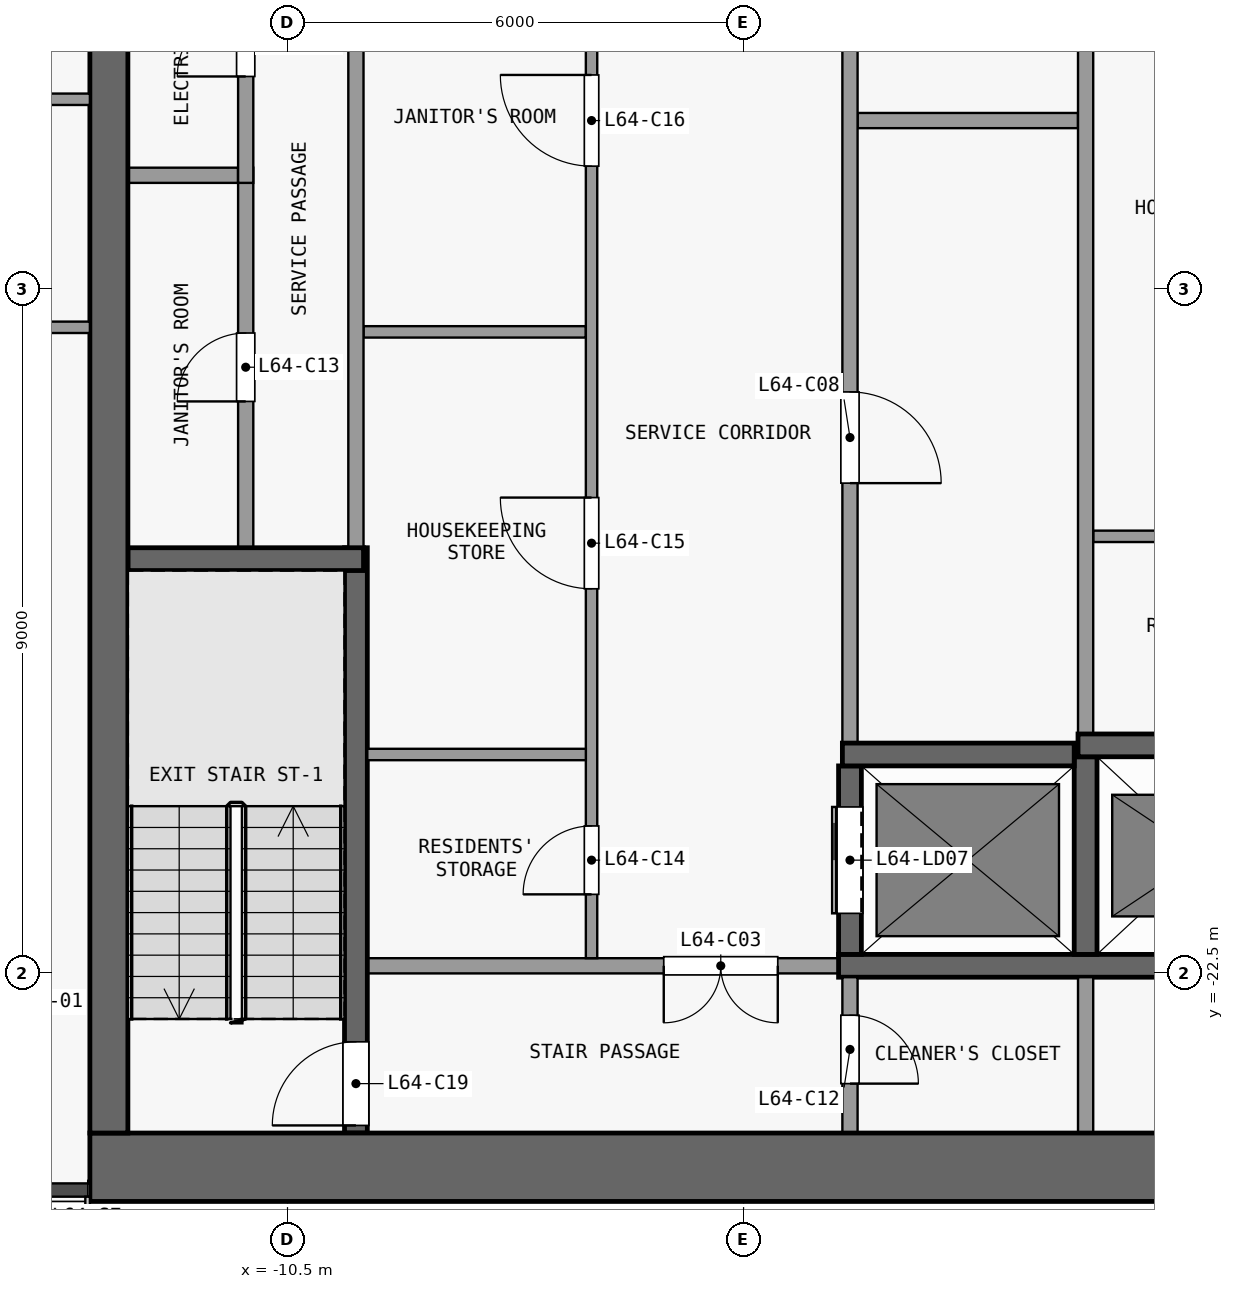
"""IFC4 building model, lengths in metres.
Left out: names, types, materials, properties, quantities, classifications, styles, units other than length and angle.
Written with IfcOpenShell. Run it as: python <this file> out.ifc"""

import sys

from ifc_helpers import new_model, si_unit, direction, frame, frame_2d, origin, place, context, subcontext, project, spatial, rectangle, extrude, element, fill, save


model = new_model("IFC4")
c1 = context("Model", 3, precision=1e-05, world=origin(), true_north=direction((0.0, 1.0)))
c2 = subcontext(c1, "Body", "Model", "MODEL_VIEW")
j1 = project(units=[si_unit("LENGTHUNIT", "METRE"), si_unit("PLANEANGLEUNIT", "RADIAN")], contexts=[c1])
p1 = place(None, origin())
s1 = spatial("IfcSite", under=j1, at=p1, CompositionType="ELEMENT")
p2 = place(p1, origin())
s2 = spatial("IfcBuilding", under=s1, at=p2, CompositionType="ELEMENT")
p3 = place(p2, frame((0.0, 0.0, 255.5)))
s3 = spatial("IfcBuildingStorey", under=s2, at=p3, CompositionType="ELEMENT", Elevation=255.5)
p4 = place(p3, frame((-13.1, -25.05, 0.0), z_axis=(0.0, 0.0, 1.0), x_axis=(1.0, 0.0, 0.0)))
e1 = element("IfcWall", 1, at=p4, inside=s3, PredefinedType="SHEAR", context=c2, shape_type="SweptSolid", body=[
    extrude(rectangle(XDim=26.2, YDim=0.9, at=frame_2d((13.1, 0.0))), origin(), (0.0, 0.0, 1.0), 3.3),
])
p5 = place(p3, frame((-12.85, -24.6, 0.0), z_axis=(0.0, 0.0, 1.0), x_axis=(0.0, 1.0, 0.0)))
e2 = element("IfcWall", 2, at=p5, inside=s3, PredefinedType="SHEAR", context=c2, shape_type="SweptSolid", body=[
    extrude(rectangle(XDim=16.1, YDim=0.5, at=frame_2d((8.05, 0.0))), origin(), (0.0, 0.0, 1.0), 3.3),
])
p6 = place(p3, frame((-3.25, -22.4, 0.0), z_axis=(0.0, 0.0, 1.0), x_axis=(-1.0, 0.0, 0.0)))
e3 = element("IfcWall", 3, at=p6, inside=s3, PredefinedType="PARTITIONING", context=c2, shape_type="SweptSolid", body=[
    extrude(rectangle(XDim=6.2, YDim=0.2, at=frame_2d((3.1, 0.0))), origin(), (0.0, 0.0, 1.0), 3.3),
])
p7 = place(p6, frame((0.8, 0.0, 0.0)))
e4 = element("IfcOpeningElement", 4, at=p7, cuts=e3, PredefinedType="OPENING", context=c2, shape_type="SweptSolid", body=[
    extrude(rectangle(XDim=1.5, YDim=2.1, at=frame_2d((0.75, 1.05))), frame((0.0, 0.11, 0.0), z_axis=(0.0, -1.0, 0.0), x_axis=(1.0, 0.0, 0.0)), (0.0, 0.0, 1.0), 0.22),
])
p8 = place(p3, frame((-3.25, -22.4, 0.0), z_axis=(0.0, 0.0, 1.0), x_axis=(1.0, 0.0, 0.0)))
e5 = element("IfcWall", 5, at=p8, inside=s3, PredefinedType="SHEAR", context=c2, shape_type="SweptSolid", body=[
    extrude(rectangle(XDim=6.5, YDim=0.3, at=frame_2d((3.25, 0.0))), origin(), (0.0, 0.0, 1.0), 3.3),
])
p9 = place(p3, frame((-9.45, -19.62, 0.0), z_axis=(0.0, 0.0, 1.0), x_axis=(1.0, 0.0, 0.0)))
e6 = element("IfcWall", 6, at=p9, inside=s3, PredefinedType="PARTITIONING", context=c2, shape_type="SweptSolid", body=[
    extrude(rectangle(XDim=2.875, YDim=0.15, at=frame_2d((1.438, 0.0))), origin(), (0.0, 0.0, 1.0), 3.3),
])
p10 = place(p3, frame((-3.2, -19.62, 0.0), z_axis=(0.0, 0.0, 1.0), x_axis=(1.0, 0.0, 0.0)))
e7 = element("IfcWall", 7, at=p10, inside=s3, PredefinedType="SHEAR", context=c2, shape_type="SweptSolid", body=[
    extrude(rectangle(XDim=3.05, YDim=0.3, at=frame_2d((1.525, 0.0))), origin(), (0.0, 0.0, 1.0), 3.3),
])
p11 = place(p3, frame((-0.1, -19.5, 0.0), z_axis=(0.0, 0.0, 1.0), x_axis=(1.0, 0.0, 0.0)))
e8 = element("IfcWall", 8, at=p11, inside=s3, PredefinedType="SHEAR", context=c2, shape_type="SweptSolid", body=[
    extrude(rectangle(XDim=3.275, YDim=0.3, at=frame_2d((1.638, 0.0))), origin(), (0.0, 0.0, 1.0), 3.3),
])
p12 = place(p3, frame((-12.6, -17.05, 0.0), z_axis=(0.0, 0.0, 1.0), x_axis=(1.0, 0.0, 0.0)))
e9 = element("IfcWall", 9, at=p12, inside=s3, PredefinedType="SHEAR", context=c2, shape_type="SweptSolid", body=[
    extrude(rectangle(XDim=3.1, YDim=0.3, at=frame_2d((1.55, 0.0))), origin(), (0.0, 0.0, 1.0), 3.3),
])
p13 = place(p3, frame((0.1, -16.75, 0.0), z_axis=(0.0, 0.0, 1.0), x_axis=(1.0, 0.0, 0.0)))
e10 = element("IfcWall", 10, at=p13, inside=s3, PredefinedType="PARTITIONING", context=c2, shape_type="SweptSolid", body=[
    extrude(rectangle(XDim=2.925, YDim=0.15, at=frame_2d((1.462, 0.0))), origin(), (0.0, 0.0, 1.0), 3.3),
])
p14 = place(p3, frame((-9.5, -14.06, 0.0), z_axis=(0.0, 0.0, 1.0), x_axis=(1.0, 0.0, 0.0)))
e11 = element("IfcWall", 11, at=p14, inside=s3, PredefinedType="PARTITIONING", context=c2, shape_type="SweptSolid", body=[
    extrude(rectangle(XDim=2.925, YDim=0.15, at=frame_2d((1.462, 0.0))), origin(), (0.0, 0.0, 1.0), 3.3),
])
p15 = place(p3, frame((-12.6, -12.0, 0.0), z_axis=(0.0, 0.0, 1.0), x_axis=(1.0, 0.0, 0.0)))
e12 = element("IfcWall", 12, at=p15, inside=s3, PredefinedType="PARTITIONING", context=c2, shape_type="SweptSolid", body=[
    extrude(rectangle(XDim=1.45, YDim=0.2, at=frame_2d((0.725, 0.0))), origin(), (0.0, 0.0, 1.0), 3.3),
])
p16 = place(p3, frame((-3.0, -11.28, 0.0), z_axis=(0.0, 0.0, 1.0), x_axis=(1.0, 0.0, 0.0)))
e13 = element("IfcWall", 13, at=p16, inside=s3, PredefinedType="PARTITIONING", context=c2, shape_type="SweptSolid", body=[
    extrude(rectangle(XDim=2.9, YDim=0.2, at=frame_2d((1.45, 0.0))), origin(), (0.0, 0.0, 1.0), 3.3),
])
p17 = place(p3, frame((-11.05, -16.9, 0.0), z_axis=(0.0, 0.0, 1.0), x_axis=(0.0, 1.0, 0.0)))
e14 = element("IfcWall", 14, at=p17, inside=s3, PredefinedType="PARTITIONING", context=c2, shape_type="SweptSolid", body=[
    extrude(rectangle(XDim=5.0, YDim=0.2, at=frame_2d((2.5, 0.0))), origin(), (0.0, 0.0, 1.0), 3.3),
])
p18 = place(p17, frame((1.925, 0.0, 0.0)))
e15 = element("IfcOpeningElement", 15, at=p18, cuts=e14, PredefinedType="OPENING", context=c2, shape_type="SweptSolid", body=[
    extrude(rectangle(XDim=0.9, YDim=2.1, at=frame_2d((0.45, 1.05))), frame((0.0, 0.11, 0.0), z_axis=(0.0, -1.0, 0.0), x_axis=(1.0, 0.0, 0.0)), (0.0, 0.0, 1.0), 0.22),
])
p19 = place(p3, frame((-11.05, -12.1, 0.0), z_axis=(0.0, 0.0, 1.0), x_axis=(0.0, 1.0, 0.0)))
e16 = element("IfcWall", 16, at=p19, inside=s3, PredefinedType="PARTITIONING", context=c2, shape_type="SweptSolid", body=[
    extrude(rectangle(XDim=3.6, YDim=0.2, at=frame_2d((1.8, 0.0))), origin(), (0.0, 0.0, 1.0), 3.3),
])
p20 = place(p19, frame((1.4, 0.0, 0.0)))
e17 = element("IfcOpeningElement", 17, at=p20, cuts=e16, PredefinedType="OPENING", context=c2, shape_type="SweptSolid", body=[
    extrude(rectangle(XDim=0.9, YDim=2.1, at=frame_2d((0.45, 1.05))), frame((0.0, 0.11, 0.0), z_axis=(0.0, -1.0, 0.0), x_axis=(1.0, 0.0, 0.0)), (0.0, 0.0, 1.0), 0.22),
])
p21 = place(p3, frame((-9.6, -24.6, 0.0), z_axis=(0.0, 0.0, 1.0), x_axis=(0.0, 1.0, 0.0)))
e18 = element("IfcWall", 18, at=p21, inside=s3, PredefinedType="SHEAR", context=c2, shape_type="SweptSolid", body=[
    extrude(rectangle(XDim=7.7, YDim=0.3, at=frame_2d((3.85, 0.0))), origin(), (0.0, 0.0, 1.0), 3.3),
])
p22 = place(p21, frame((0.1, 0.0, 0.0)))
e19 = element("IfcOpeningElement", 19, at=p22, cuts=e18, PredefinedType="OPENING", context=c2, shape_type="SweptSolid", body=[
    extrude(rectangle(XDim=1.1, YDim=2.1, at=frame_2d((0.55, 1.05))), frame((0.0, 0.16, 0.0), z_axis=(0.0, -1.0, 0.0), x_axis=(1.0, 0.0, 0.0)), (0.0, 0.0, 1.0), 0.32),
])
p23 = place(p3, frame((-9.6, -16.9, 0.0), z_axis=(0.0, 0.0, 1.0), x_axis=(0.0, 1.0, 0.0)))
e20 = element("IfcWall", 20, at=p23, inside=s3, PredefinedType="PARTITIONING", context=c2, shape_type="SweptSolid", body=[
    extrude(rectangle(XDim=8.4, YDim=0.2, at=frame_2d((4.2, 0.0))), origin(), (0.0, 0.0, 1.0), 3.3),
])
p24 = place(p3, frame((-6.5, -22.3, 0.0), z_axis=(0.0, 0.0, 1.0), x_axis=(0.0, 1.0, 0.0)))
e21 = element("IfcWall", 21, at=p24, inside=s3, PredefinedType="PARTITIONING", context=c2, shape_type="SweptSolid", body=[
    extrude(rectangle(XDim=13.8, YDim=0.15, at=frame_2d((6.9, 0.0))), origin(), (0.0, 0.0, 1.0), 3.3),
])
p25 = place(p24, frame((0.84, 0.0, 0.0)))
e22 = element("IfcOpeningElement", 22, at=p25, cuts=e21, PredefinedType="OPENING", context=c2, shape_type="SweptSolid", body=[
    extrude(rectangle(XDim=0.9, YDim=2.1, at=frame_2d((0.45, 1.05))), frame((0.0, 0.085, 0.0), z_axis=(0.0, -1.0, 0.0), x_axis=(1.0, 0.0, 0.0)), (0.0, 0.0, 1.0), 0.17),
])
p26 = place(p24, frame((4.86, 0.0, 0.0)))
e23 = element("IfcOpeningElement", 23, at=p26, cuts=e21, PredefinedType="OPENING", context=c2, shape_type="SweptSolid", body=[
    extrude(rectangle(XDim=1.2, YDim=2.1, at=frame_2d((0.6, 1.05))), frame((0.0, 0.085, 0.0), z_axis=(0.0, -1.0, 0.0), x_axis=(1.0, 0.0, 0.0)), (0.0, 0.0, 1.0), 0.17),
])
p27 = place(p24, frame((10.42, 0.0, 0.0)))
e24 = element("IfcOpeningElement", 24, at=p27, cuts=e21, PredefinedType="OPENING", context=c2, shape_type="SweptSolid", body=[
    extrude(rectangle(XDim=1.2, YDim=2.1, at=frame_2d((0.6, 1.05))), frame((0.0, 0.085, 0.0), z_axis=(0.0, -1.0, 0.0), x_axis=(1.0, 0.0, 0.0)), (0.0, 0.0, 1.0), 0.17),
])
p28 = place(p3, frame((-3.1, -22.55, 0.0), z_axis=(0.0, 0.0, 1.0), x_axis=(0.0, -1.0, 0.0)))
e25 = element("IfcWall", 25, at=p28, inside=s3, PredefinedType="PARTITIONING", context=c2, shape_type="SweptSolid", body=[
    extrude(rectangle(XDim=2.05, YDim=0.2, at=frame_2d((1.025, 0.0))), origin(), (0.0, 0.0, 1.0), 3.3),
])
p29 = place(p28, frame((0.5, 0.0, 0.0)))
e26 = element("IfcOpeningElement", 26, at=p29, cuts=e25, PredefinedType="OPENING", context=c2, shape_type="SweptSolid", body=[
    extrude(rectangle(XDim=0.9, YDim=2.1, at=frame_2d((0.45, 1.05))), frame((0.0, 0.11, 0.0), z_axis=(0.0, -1.0, 0.0), x_axis=(1.0, 0.0, 0.0)), (0.0, 0.0, 1.0), 0.22),
])
p30 = place(p3, frame((-3.1, -22.25, 0.0), z_axis=(0.0, 0.0, 1.0), x_axis=(0.0, 1.0, 0.0)))
e27 = element("IfcWall", 27, at=p30, inside=s3, PredefinedType="SHEAR", context=c2, shape_type="SweptSolid", body=[
    extrude(rectangle(XDim=2.48, YDim=0.3, at=frame_2d((1.24, 0.0))), origin(), (0.0, 0.0, 1.0), 3.3),
])
p31 = place(p30, frame((0.54, 0.0, 0.0)))
e28 = element("IfcOpeningElement", 28, at=p31, cuts=e27, PredefinedType="OPENING", context=c2, shape_type="SweptSolid", body=[
    extrude(rectangle(XDim=1.4, YDim=2.1, at=frame_2d((0.7, 1.05))), frame((0.0, 0.16, 0.0), z_axis=(0.0, -1.0, 0.0), x_axis=(1.0, 0.0, 0.0)), (0.0, 0.0, 1.0), 0.32),
])
p32 = place(p3, frame((-3.1, -8.5, 0.0), z_axis=(0.0, 0.0, 1.0), x_axis=(0.0, -1.0, 0.0)))
e29 = element("IfcWall", 29, at=p32, inside=s3, PredefinedType="PARTITIONING", context=c2, shape_type="SweptSolid", body=[
    extrude(rectangle(XDim=10.97, YDim=0.2, at=frame_2d((5.485, 0.0))), origin(), (0.0, 0.0, 1.0), 3.3),
])
p33 = place(p32, frame((6.35, 0.0, 0.0)))
e30 = element("IfcOpeningElement", 30, at=p33, cuts=e29, PredefinedType="OPENING", context=c2, shape_type="SweptSolid", body=[
    extrude(rectangle(XDim=1.2, YDim=2.1, at=frame_2d((0.6, 1.05))), frame((0.0, 0.11, 0.0), z_axis=(0.0, -1.0, 0.0), x_axis=(1.0, 0.0, 0.0)), (0.0, 0.0, 1.0), 0.22),
])
p34 = place(p32, frame((0.94, 0.0, 0.0)))
e31 = element("IfcOpeningElement", 31, at=p34, cuts=e29, PredefinedType="OPENING", context=c2, shape_type="SweptSolid", body=[
    extrude(rectangle(XDim=0.9, YDim=2.1, at=frame_2d((0.45, 1.05))), frame((0.0, 0.11, 0.0), z_axis=(0.0, -1.0, 0.0), x_axis=(1.0, 0.0, 0.0)), (0.0, 0.0, 1.0), 0.22),
])
p35 = place(p3, frame((0.0, -24.6, 0.0), z_axis=(0.0, 0.0, 1.0), x_axis=(0.0, 1.0, 0.0)))
e32 = element("IfcWall", 32, at=p35, inside=s3, PredefinedType="PARTITIONING", context=c2, shape_type="SweptSolid", body=[
    extrude(rectangle(XDim=2.05, YDim=0.2, at=frame_2d((1.025, 0.0))), origin(), (0.0, 0.0, 1.0), 3.3),
])
p36 = place(p3, frame((0.0, -22.25, 0.0), z_axis=(0.0, 0.0, 1.0), x_axis=(0.0, 1.0, 0.0)))
e33 = element("IfcWall", 33, at=p36, inside=s3, PredefinedType="SHEAR", context=c2, shape_type="SweptSolid", body=[
    extrude(rectangle(XDim=2.6, YDim=0.3, at=frame_2d((1.3, 0.0))), origin(), (0.0, 0.0, 1.0), 3.3),
])
p37 = place(p3, frame((0.0, -19.35, 0.0), z_axis=(0.0, 0.0, 1.0), x_axis=(0.0, 1.0, 0.0)))
e34 = element("IfcWall", 34, at=p37, inside=s3, PredefinedType="PARTITIONING", context=c2, shape_type="SweptSolid", body=[
    extrude(rectangle(XDim=10.85, YDim=0.2, at=frame_2d((5.425, 0.0))), origin(), (0.0, 0.0, 1.0), 3.3),
])
p38 = place(p3, frame((-19.262, -14.0, 0.0), z_axis=(0.0, 0.0, 1.0), x_axis=(1.0, 0.0, 0.0)))
e35 = element("IfcWall", 35, at=p38, inside=s3, PredefinedType="PARTITIONING", context=c2, shape_type="SweptSolid", body=[
    extrude(rectangle(XDim=6.162, YDim=0.15, at=frame_2d((3.081, 0.0))), origin(), (0.0, 0.0, 1.0), 3.3),
])
p39 = place(p38, frame((0.812, 0.0, 0.0)))
e36 = element("IfcOpeningElement", 36, at=p39, cuts=e35, PredefinedType="OPENING", context=c2, shape_type="SweptSolid", body=[
    extrude(rectangle(XDim=0.9, YDim=2.1, at=frame_2d((0.45, 1.05))), frame((0.0, 0.085, 0.0), z_axis=(0.0, -1.0, 0.0), x_axis=(1.0, 0.0, 0.0)), (0.0, 0.0, 1.0), 0.17),
])
p40 = place(p3, frame((-19.262, -11.0, 0.0), z_axis=(0.0, 0.0, 1.0), x_axis=(1.0, 0.0, 0.0)))
e37 = element("IfcWall", 37, at=p40, inside=s3, PredefinedType="PARTITIONING", context=c2, shape_type="SweptSolid", body=[
    extrude(rectangle(XDim=6.162, YDim=0.15, at=frame_2d((3.081, 0.0))), origin(), (0.0, 0.0, 1.0), 3.3),
])
p41 = place(p40, frame((1.113, 0.0, 0.0)))
e38 = element("IfcOpeningElement", 38, at=p41, cuts=e37, PredefinedType="OPENING", context=c2, shape_type="SweptSolid", body=[
    extrude(rectangle(XDim=0.9, YDim=2.1, at=frame_2d((0.45, 1.05))), frame((0.0, 0.085, 0.0), z_axis=(0.0, -1.0, 0.0), x_axis=(1.0, 0.0, 0.0)), (0.0, 0.0, 1.0), 0.17),
])
p42 = place(p40, frame((4.162, 0.0, 0.0)))
e39 = element("IfcOpeningElement", 39, at=p42, cuts=e37, PredefinedType="OPENING", context=c2, shape_type="SweptSolid", body=[
    extrude(rectangle(XDim=0.9, YDim=2.1, at=frame_2d((0.45, 1.05))), frame((0.0, 0.085, 0.0), z_axis=(0.0, -1.0, 0.0), x_axis=(1.0, 0.0, 0.0)), (0.0, 0.0, 1.0), 0.17),
])
p43 = place(p31, origin())
e40 = element("IfcDoor", 40, at=p43, inside=s3, OperationType="DOUBLE_DOOR_SLIDING", PredefinedType="DOOR", context=c2, shape_type="SweptSolid", body=[
    extrude(rectangle(XDim=1.4, YDim=2.1, at=frame_2d((0.7, 1.05))), frame((0.0, 0.025, 0.0), z_axis=(0.0, -1.0, 0.0), x_axis=(1.0, 0.0, 0.0)), (0.0, 0.0, 1.0), 0.05),
])
fill(e28, e40)
p44 = place(p7, origin())
e41 = element("IfcDoor", 41, at=p44, inside=s3, OperationType="DOUBLE_DOOR_SINGLE_SWING", PredefinedType="DOOR", context=c2, shape_type="SweptSolid", body=[
    extrude(rectangle(XDim=1.5, YDim=2.1, at=frame_2d((0.75, 1.05))), frame((0.0, 0.025, 0.0), z_axis=(0.0, -1.0, 0.0), x_axis=(1.0, 0.0, 0.0)), (0.0, 0.0, 1.0), 0.05),
])
fill(e4, e41)
p45 = place(p20, origin())
e42 = element("IfcDoor", 42, at=p45, inside=s3, OperationType="SINGLE_SWING_LEFT", PredefinedType="DOOR", context=c2, shape_type="SweptSolid", body=[
    extrude(rectangle(XDim=0.9, YDim=2.1, at=frame_2d((0.45, 1.05))), frame((0.0, 0.025, 0.0), z_axis=(0.0, -1.0, 0.0), x_axis=(1.0, 0.0, 0.0)), (0.0, 0.0, 1.0), 0.05),
])
fill(e17, e42)
p46 = place(p33, origin())
e43 = element("IfcDoor", 43, at=p46, inside=s3, OperationType="SINGLE_SWING_RIGHT", PredefinedType="DOOR", context=c2, shape_type="SweptSolid", body=[
    extrude(rectangle(XDim=1.2, YDim=2.1, at=frame_2d((0.6, 1.05))), frame((0.0, 0.025, 0.0), z_axis=(0.0, -1.0, 0.0), x_axis=(1.0, 0.0, 0.0)), (0.0, 0.0, 1.0), 0.05),
])
fill(e30, e43)
p47 = place(p29, origin())
e44 = element("IfcDoor", 44, at=p47, inside=s3, OperationType="SINGLE_SWING_RIGHT", PredefinedType="DOOR", context=c2, shape_type="SweptSolid", body=[
    extrude(rectangle(XDim=0.9, YDim=2.1, at=frame_2d((0.45, 1.05))), frame((0.0, 0.025, 0.0), z_axis=(0.0, -1.0, 0.0), x_axis=(1.0, 0.0, 0.0)), (0.0, 0.0, 1.0), 0.05),
])
fill(e26, e44)
p48 = place(p18, origin())
e45 = element("IfcDoor", 45, at=p48, inside=s3, OperationType="SINGLE_SWING_LEFT", PredefinedType="DOOR", context=c2, shape_type="SweptSolid", body=[
    extrude(rectangle(XDim=0.9, YDim=2.1, at=frame_2d((0.45, 1.05))), frame((0.0, 0.025, 0.0), z_axis=(0.0, -1.0, 0.0), x_axis=(1.0, 0.0, 0.0)), (0.0, 0.0, 1.0), 0.05),
])
fill(e15, e45)
p49 = place(p25, origin())
e46 = element("IfcDoor", 46, at=p49, inside=s3, OperationType="SINGLE_SWING_LEFT", PredefinedType="DOOR", context=c2, shape_type="SweptSolid", body=[
    extrude(rectangle(XDim=0.9, YDim=2.1, at=frame_2d((0.45, 1.05))), frame((0.0, 0.025, 0.0), z_axis=(0.0, -1.0, 0.0), x_axis=(1.0, 0.0, 0.0)), (0.0, 0.0, 1.0), 0.05),
])
fill(e22, e46)
p50 = place(p26, origin())
e47 = element("IfcDoor", 47, at=p50, inside=s3, OperationType="SINGLE_SWING_RIGHT", PredefinedType="DOOR", context=c2, shape_type="SweptSolid", body=[
    extrude(rectangle(XDim=1.2, YDim=2.1, at=frame_2d((0.6, 1.05))), frame((0.0, 0.025, 0.0), z_axis=(0.0, -1.0, 0.0), x_axis=(1.0, 0.0, 0.0)), (0.0, 0.0, 1.0), 0.05),
])
fill(e23, e47)
p51 = place(p27, origin())
e48 = element("IfcDoor", 48, at=p51, inside=s3, OperationType="SINGLE_SWING_RIGHT", PredefinedType="DOOR", context=c2, shape_type="SweptSolid", body=[
    extrude(rectangle(XDim=1.2, YDim=2.1, at=frame_2d((0.6, 1.05))), frame((0.0, 0.025, 0.0), z_axis=(0.0, -1.0, 0.0), x_axis=(1.0, 0.0, 0.0)), (0.0, 0.0, 1.0), 0.05),
])
fill(e24, e48)
p52 = place(p22, origin())
e49 = element("IfcDoor", 49, at=p52, inside=s3, OperationType="SINGLE_SWING_LEFT", PredefinedType="DOOR", context=c2, shape_type="SweptSolid", body=[
    extrude(rectangle(XDim=1.1, YDim=2.1, at=frame_2d((0.55, 1.05))), frame((0.0, 0.025, 0.0), z_axis=(0.0, -1.0, 0.0), x_axis=(1.0, 0.0, 0.0)), (0.0, 0.0, 1.0), 0.05),
])
fill(e19, e49)
save(model, sys.argv[1])
